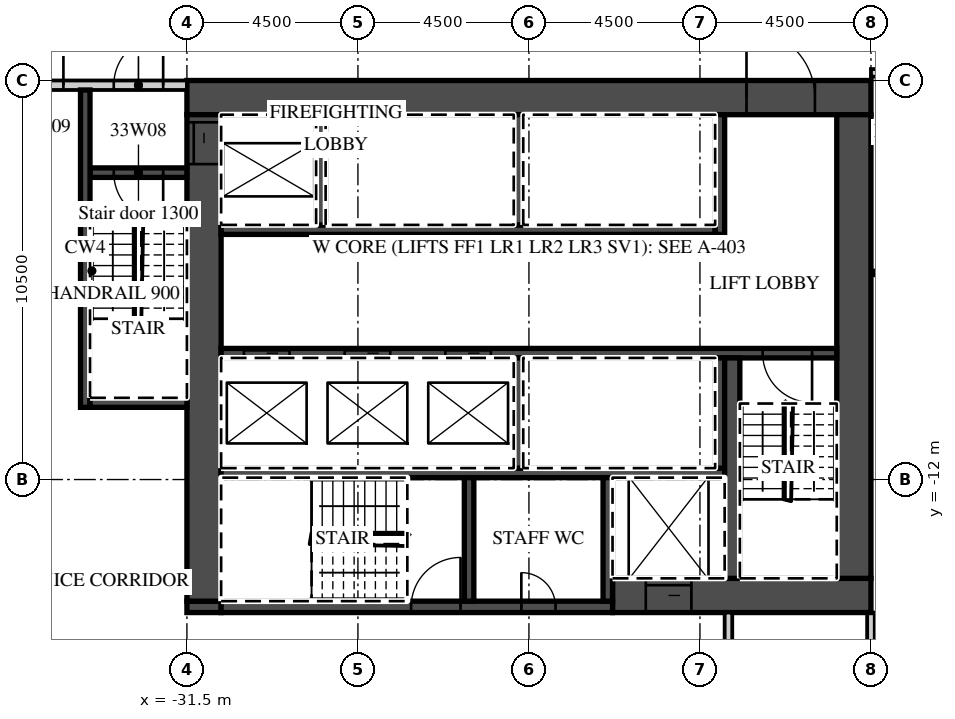
"""IFC4 building model, lengths in metres.
Left out: names, types, materials, properties, quantities, classifications, styles, units other than length and angle.
Written with IfcOpenShell. Run it as: python <this file> out.ifc"""

import sys

from ifc_helpers import new_model, si_unit, direction, frame, frame_2d, origin, place, context, subcontext, project, spatial, rectangle, extrude, element, fill, save


model = new_model("IFC4")
c1 = context("Model", 3, precision=1e-05, world=origin(), true_north=direction((0.0, 1.0)))
c2 = subcontext(c1, "Body", "Model", "MODEL_VIEW")
j1 = project(units=[si_unit("LENGTHUNIT", "METRE"), si_unit("PLANEANGLEUNIT", "RADIAN")], contexts=[c1])
p1 = place(None, origin())
s1 = spatial("IfcSite", under=j1, at=p1, CompositionType="ELEMENT")
p2 = place(p1, origin())
s2 = spatial("IfcBuilding", under=s1, at=p2, CompositionType="ELEMENT")
p3 = place(p2, frame((0.0, 0.0, 143.8)))
s3 = spatial("IfcBuildingStorey", under=s2, at=p3, CompositionType="ELEMENT", Elevation=143.8)
p4 = place(p3, frame((-13.5, -22.232, 0.0), z_axis=(0.0, 0.0, 1.0), x_axis=(0.0, 1.0, 0.0)))
e1 = element("IfcWall", 1, at=p4, inside=s3, PredefinedType="PARTITIONING", context=c2, shape_type="SweptSolid", body=[
    extrude(rectangle(XDim=6.732, YDim=0.2, at=frame_2d((3.366, 0.0))), origin(), (0.0, 0.0, 1.0), 3.02),
])
p5 = place(p3, frame((-13.5, -1.3, 0.0), z_axis=(0.0, 0.0, 1.0), x_axis=(1.0, 0.0, 0.0)))
e2 = element("IfcWall", 2, at=p5, inside=s3, PredefinedType="PARTITIONING", context=c2, shape_type="SweptSolid", body=[
    extrude(rectangle(XDim=60.932, YDim=0.2, at=frame_2d((30.466, 0.0))), origin(), (0.0, 0.0, 1.0), 3.02),
])
p6 = place(p5, frame((2.925, 0.0, 0.0)))
e3 = element("IfcOpeningElement", 3, at=p6, cuts=e2, PredefinedType="OPENING", context=c2, shape_type="SweptSolid", body=[
    extrude(rectangle(XDim=1.0, YDim=2.1, at=frame_2d((0.5, 1.05))), frame((0.0, 0.11, 0.0), z_axis=(0.0, -1.0, 0.0), x_axis=(1.0, 0.0, 0.0)), (0.0, 0.0, 1.0), 0.22),
])
p7 = place(p5, frame((6.938, 0.0, 0.0)))
e4 = element("IfcOpeningElement", 4, at=p7, cuts=e2, PredefinedType="OPENING", context=c2, shape_type="SweptSolid", body=[
    extrude(rectangle(XDim=1.2, YDim=2.1, at=frame_2d((0.6, 1.05))), frame((0.0, 0.11, 0.0), z_axis=(0.0, -1.0, 0.0), x_axis=(1.0, 0.0, 0.0)), (0.0, 0.0, 1.0), 0.22),
])
p8 = place(p5, frame((15.938, 0.0, 0.0)))
e5 = element("IfcOpeningElement", 5, at=p8, cuts=e2, PredefinedType="OPENING", context=c2, shape_type="SweptSolid", body=[
    extrude(rectangle(XDim=1.2, YDim=2.1, at=frame_2d((0.6, 1.05))), frame((0.0, 0.11, 0.0), z_axis=(0.0, -1.0, 0.0), x_axis=(1.0, 0.0, 0.0)), (0.0, 0.0, 1.0), 0.22),
])
p9 = place(p5, frame((24.938, 0.0, 0.0)))
e6 = element("IfcOpeningElement", 6, at=p9, cuts=e2, PredefinedType="OPENING", context=c2, shape_type="SweptSolid", body=[
    extrude(rectangle(XDim=1.2, YDim=2.1, at=frame_2d((0.6, 1.05))), frame((0.0, 0.11, 0.0), z_axis=(0.0, -1.0, 0.0), x_axis=(1.0, 0.0, 0.0)), (0.0, 0.0, 1.0), 0.22),
])
p10 = place(p5, frame((32.075, 0.0, 0.0)))
e7 = element("IfcOpeningElement", 7, at=p10, cuts=e2, PredefinedType="OPENING", context=c2, shape_type="SweptSolid", body=[
    extrude(rectangle(XDim=1.0, YDim=2.1, at=frame_2d((0.5, 1.05))), frame((0.0, 0.11, 0.0), z_axis=(0.0, -1.0, 0.0), x_axis=(1.0, 0.0, 0.0)), (0.0, 0.0, 1.0), 0.22),
])
p11 = place(p5, frame((36.55, 0.0, 0.0)))
e8 = element("IfcOpeningElement", 8, at=p11, cuts=e2, PredefinedType="OPENING", context=c2, shape_type="SweptSolid", body=[
    extrude(rectangle(XDim=1.0, YDim=2.1, at=frame_2d((0.5, 1.05))), frame((0.0, 0.11, 0.0), z_axis=(0.0, -1.0, 0.0), x_axis=(1.0, 0.0, 0.0)), (0.0, 0.0, 1.0), 0.22),
])
p12 = place(p5, frame((42.938, 0.0, 0.0)))
e9 = element("IfcOpeningElement", 9, at=p12, cuts=e2, PredefinedType="OPENING", context=c2, shape_type="SweptSolid", body=[
    extrude(rectangle(XDim=1.2, YDim=2.1, at=frame_2d((0.6, 1.05))), frame((0.0, 0.11, 0.0), z_axis=(0.0, -1.0, 0.0), x_axis=(1.0, 0.0, 0.0)), (0.0, 0.0, 1.0), 0.22),
])
p13 = place(p5, frame((52.425, 0.0, 0.0)))
e10 = element("IfcOpeningElement", 10, at=p13, cuts=e2, PredefinedType="OPENING", context=c2, shape_type="SweptSolid", body=[
    extrude(rectangle(XDim=1.0, YDim=2.1, at=frame_2d((0.5, 1.05))), frame((0.0, 0.11, 0.0), z_axis=(0.0, -1.0, 0.0), x_axis=(1.0, 0.0, 0.0)), (0.0, 0.0, 1.0), 0.22),
])
p14 = place(p5, frame((58.316, 0.0, 0.0)))
e11 = element("IfcOpeningElement", 11, at=p14, cuts=e2, PredefinedType="OPENING", context=c2, shape_type="SweptSolid", body=[
    extrude(rectangle(XDim=1.2, YDim=2.1, at=frame_2d((0.6, 1.05))), frame((0.0, 0.11, 0.0), z_axis=(0.0, -1.0, 0.0), x_axis=(1.0, 0.0, 0.0)), (0.0, 0.0, 1.0), 0.22),
])
p15 = place(p3, frame((-31.5, -1.95, 0.0), z_axis=(0.0, 0.0, 1.0), x_axis=(1.0, 0.0, 0.0)))
e12 = element("IfcWall", 12, at=p15, inside=s3, PredefinedType="SHEAR", context=c2, shape_type="SweptSolid", body=[
    extrude(rectangle(XDim=18.0, YDim=0.9, at=frame_2d((9.0, 0.0))), origin(), (0.0, 0.0, 1.0), 3.02),
])
p16 = place(p15, frame((14.725, 0.0, 0.0)))
e13 = element("IfcOpeningElement", 13, at=p16, cuts=e12, PredefinedType="OPENING", context=c2, shape_type="SweptSolid", body=[
    extrude(rectangle(XDim=1.8, YDim=2.1, at=frame_2d((0.9, 1.05))), frame((0.0, 0.46, 0.0), z_axis=(0.0, -1.0, 0.0), x_axis=(1.0, 0.0, 0.0)), (0.0, 0.0, 1.0), 0.92),
])
p17 = place(p3, frame((-20.3, -15.05, 0.0), z_axis=(0.0, 0.0, 1.0), x_axis=(1.0, 0.0, 0.0)))
e14 = element("IfcWall", 14, at=p17, inside=s3, PredefinedType="SHEAR", context=c2, shape_type="SweptSolid", body=[
    extrude(rectangle(XDim=6.8, YDim=0.9, at=frame_2d((3.4, 0.0))), origin(), (0.0, 0.0, 1.0), 3.02),
])
p18 = place(p17, frame((0.875, 0.0, 0.0)))
e15 = element("IfcOpeningElement", 15, at=p18, cuts=e14, PredefinedType="OPENING", context=c2, shape_type="SweptSolid", body=[
    extrude(rectangle(XDim=1.2, YDim=2.1, at=frame_2d((0.6, 1.05))), frame((0.0, 0.46, 0.0), z_axis=(0.0, -1.0, 0.0), x_axis=(1.0, 0.0, 0.0)), (0.0, 0.0, 1.0), 0.92),
])
p19 = place(p3, frame((-31.5, -15.35, 0.0), z_axis=(0.0, 0.0, 1.0), x_axis=(1.0, 0.0, 0.0)))
e16 = element("IfcWall", 16, at=p19, inside=s3, PredefinedType="SHEAR", context=c2, shape_type="SweptSolid", body=[
    extrude(rectangle(XDim=0.9, YDim=0.3, at=frame_2d((0.45, 0.0))), origin(), (0.0, 0.0, 1.0), 3.02),
])
p20 = place(p3, frame((-30.6, -15.35, 0.0), z_axis=(0.0, 0.0, 1.0), x_axis=(1.0, 0.0, 0.0)))
e17 = element("IfcWall", 17, at=p20, inside=s3, PredefinedType="SHEAR", context=c2, shape_type="SweptSolid", body=[
    extrude(rectangle(XDim=10.3, YDim=0.3, at=frame_2d((5.15, 0.0))), origin(), (0.0, 0.0, 1.0), 3.02),
])
p21 = place(p20, frame((5.0, 0.0, 0.0)))
e18 = element("IfcOpeningElement", 18, at=p21, cuts=e17, PredefinedType="OPENING", context=c2, shape_type="SweptSolid", body=[
    extrude(rectangle(XDim=1.3, YDim=2.1, at=frame_2d((0.65, 1.05))), frame((0.0, 0.16, 0.0), z_axis=(0.0, -1.0, 0.0), x_axis=(1.0, 0.0, 0.0)), (0.0, 0.0, 1.0), 0.32),
])
p22 = place(p20, frame((7.9, 0.0, 0.0)))
e19 = element("IfcOpeningElement", 19, at=p22, cuts=e17, PredefinedType="OPENING", context=c2, shape_type="SweptSolid", body=[
    extrude(rectangle(XDim=0.9, YDim=2.1, at=frame_2d((0.45, 1.05))), frame((0.0, 0.16, 0.0), z_axis=(0.0, -1.0, 0.0), x_axis=(1.0, 0.0, 0.0)), (0.0, 0.0, 1.0), 0.32),
])
p23 = place(p3, frame((-31.05, -15.2, 0.0), z_axis=(0.0, 0.0, 1.0), x_axis=(0.0, 1.0, 0.0)))
e20 = element("IfcWall", 20, at=p23, inside=s3, PredefinedType="SHEAR", context=c2, shape_type="SweptSolid", body=[
    extrude(rectangle(XDim=12.8, YDim=0.9, at=frame_2d((6.4, 0.0))), origin(), (0.0, 0.0, 1.0), 3.02),
])
p24 = place(p23, frame((11.5, 0.0, 0.0)))
e21 = element("IfcOpeningElement", 21, at=p24, cuts=e20, PredefinedType="OPENING", context=c2, shape_type="SweptSolid", body=[
    extrude(rectangle(XDim=1.1, YDim=2.1, at=frame_2d((0.55, 1.05))), frame((0.0, 0.46, 0.0), z_axis=(0.0, -1.0, 0.0), x_axis=(1.0, 0.0, 0.0)), (0.0, 0.0, 1.0), 0.92),
])
p25 = place(p3, frame((-13.95, -14.6, 0.0), z_axis=(0.0, 0.0, 1.0), x_axis=(0.0, 1.0, 0.0)))
e22 = element("IfcWall", 22, at=p25, inside=s3, PredefinedType="SHEAR", context=c2, shape_type="SweptSolid", body=[
    extrude(rectangle(XDim=12.2, YDim=0.9, at=frame_2d((6.1, 0.0))), origin(), (0.0, 0.0, 1.0), 3.02),
])
p26 = place(p3, frame((-30.6, -5.425, 0.0), z_axis=(0.0, 0.0, 1.0), x_axis=(1.0, 0.0, 0.0)))
e23 = element("IfcWall", 23, at=p26, inside=s3, PredefinedType="SHEAR", context=c2, shape_type="SweptSolid", body=[
    extrude(rectangle(XDim=13.0, YDim=0.25, at=frame_2d((6.5, 0.0))), origin(), (0.0, 0.0, 1.0), 3.02),
])
p27 = place(p3, frame((-17.475, -5.55, 0.0), z_axis=(0.0, 0.0, 1.0), x_axis=(0.0, 1.0, 0.0)))
e24 = element("IfcWall", 24, at=p27, inside=s3, PredefinedType="SHEAR", context=c2, shape_type="SweptSolid", body=[
    extrude(rectangle(XDim=3.15, YDim=0.25, at=frame_2d((1.575, 0.0))), origin(), (0.0, 0.0, 1.0), 3.02),
])
for number, where, z_axis, x_axis in (
    (25, (-27.975, -5.3, 0.0), (0.0, 0.0, 1.0), (0.0, 1.0, 0.0)),
    (26, (-22.775, -5.3, 0.0), (0.0, 0.0, 1.0), (0.0, 1.0, 0.0)),
):
    element("IfcWall", number, at=place(p3, frame(where, z_axis=z_axis, x_axis=x_axis)), inside=s3, PredefinedType="SHEAR", context=c2, shape_type="SweptSolid", body=[
        extrude(rectangle(XDim=2.9, YDim=0.25, at=frame_2d((1.45, 0.0))), origin(), (0.0, 0.0, 1.0), 3.02),
    ])
p28 = place(p3, frame((-30.6, -8.675, 0.0), z_axis=(0.0, 0.0, 1.0), x_axis=(1.0, 0.0, 0.0)))
e27 = element("IfcWall", 27, at=p28, inside=s3, PredefinedType="SHEAR", context=c2, shape_type="SweptSolid", body=[
    extrude(rectangle(XDim=16.2, YDim=0.25, at=frame_2d((8.1, 0.0))), origin(), (0.0, 0.0, 1.0), 3.02),
])
p29 = place(p28, frame((0.6, 0.0, 0.0)))
e28 = element("IfcOpeningElement", 28, at=p29, cuts=e27, PredefinedType="OPENING", context=c2, shape_type="SweptSolid", body=[
    extrude(rectangle(XDim=1.2, YDim=2.1, at=frame_2d((0.6, 1.05))), frame((0.0, 0.135, 0.0), z_axis=(0.0, -1.0, 0.0), x_axis=(1.0, 0.0, 0.0)), (0.0, 0.0, 1.0), 0.27),
])
p30 = place(p28, frame((3.25, 0.0, 0.0)))
e29 = element("IfcOpeningElement", 29, at=p30, cuts=e27, PredefinedType="OPENING", context=c2, shape_type="SweptSolid", body=[
    extrude(rectangle(XDim=1.2, YDim=2.1, at=frame_2d((0.6, 1.05))), frame((0.0, 0.135, 0.0), z_axis=(0.0, -1.0, 0.0), x_axis=(1.0, 0.0, 0.0)), (0.0, 0.0, 1.0), 0.27),
])
p31 = place(p28, frame((5.9, 0.0, 0.0)))
e30 = element("IfcOpeningElement", 30, at=p31, cuts=e27, PredefinedType="OPENING", context=c2, shape_type="SweptSolid", body=[
    extrude(rectangle(XDim=1.2, YDim=2.1, at=frame_2d((0.6, 1.05))), frame((0.0, 0.135, 0.0), z_axis=(0.0, -1.0, 0.0), x_axis=(1.0, 0.0, 0.0)), (0.0, 0.0, 1.0), 0.27),
])
p32 = place(p28, frame((14.25, 0.0, 0.0)))
e31 = element("IfcOpeningElement", 31, at=p32, cuts=e27, PredefinedType="OPENING", context=c2, shape_type="SweptSolid", body=[
    extrude(rectangle(XDim=1.3, YDim=2.1, at=frame_2d((0.65, 1.05))), frame((0.0, 0.135, 0.0), z_axis=(0.0, -1.0, 0.0), x_axis=(1.0, 0.0, 0.0)), (0.0, 0.0, 1.0), 0.27),
])
p33 = place(p3, frame((-30.6, -11.825, 0.0), z_axis=(0.0, 0.0, 1.0), x_axis=(1.0, 0.0, 0.0)))
e32 = element("IfcWall", 32, at=p33, inside=s3, PredefinedType="SHEAR", context=c2, shape_type="SweptSolid", body=[
    extrude(rectangle(XDim=13.25, YDim=0.25, at=frame_2d((6.625, 0.0))), origin(), (0.0, 0.0, 1.0), 3.02),
])
for number, where, z_axis, x_axis in (
    (33, (-17.475, -11.7, 0.0), (0.0, 0.0, 1.0), (0.0, 1.0, 0.0)),
    (34, (-22.775, -11.7, 0.0), (0.0, 0.0, 1.0), (0.0, 1.0, 0.0)),
):
    element("IfcWall", number, at=place(p3, frame(where, z_axis=z_axis, x_axis=x_axis)), inside=s3, PredefinedType="SHEAR", context=c2, shape_type="SweptSolid", body=[
        extrude(rectangle(XDim=2.9, YDim=0.25, at=frame_2d((1.45, 0.0))), origin(), (0.0, 0.0, 1.0), 3.02),
    ])
p34 = place(p3, frame((-17.15, -14.6, 0.0), z_axis=(0.0, 0.0, 1.0), x_axis=(0.0, 1.0, 0.0)))
e35 = element("IfcWall", 35, at=p34, inside=s3, PredefinedType="SHEAR", context=c2, shape_type="SweptSolid", body=[
    extrude(rectangle(XDim=5.8, YDim=0.4, at=frame_2d((2.9, 0.0))), origin(), (0.0, 0.0, 1.0), 3.02),
])
for number, where, z_axis, x_axis in (
    (36, (-20.425, -15.2, 0.0), (0.0, 0.0, 1.0), (0.0, 1.0, 0.0)),
    (37, (-24.075, -15.2, 0.0), (0.0, 0.0, 1.0), (0.0, 1.0, 0.0)),
):
    element("IfcWall", number, at=place(p3, frame(where, z_axis=z_axis, x_axis=x_axis)), inside=s3, PredefinedType="SHEAR", context=c2, shape_type="SweptSolid", body=[
        extrude(rectangle(XDim=3.25, YDim=0.25, at=frame_2d((1.625, 0.0))), origin(), (0.0, 0.0, 1.0), 3.02),
    ])
p35 = place(p3, frame((-39.035, -1.625, 0.0), z_axis=(0.0, 0.0, 1.0), x_axis=(1.0, 0.0, 0.0)))
e38 = element("IfcWall", 38, at=p35, inside=s3, PredefinedType="PARTITIONING", context=c2, shape_type="SweptSolid", body=[
    extrude(rectangle(XDim=7.535, YDim=0.25, at=frame_2d((3.768, 0.0))), origin(), (0.0, 0.0, 1.0), 3.02),
])
p36 = place(p35, frame((5.61, 0.0, 0.0)))
e39 = element("IfcOpeningElement", 39, at=p36, cuts=e38, PredefinedType="OPENING", context=c2, shape_type="SweptSolid", body=[
    extrude(rectangle(XDim=1.3, YDim=2.1, at=frame_2d((0.65, 1.05))), frame((0.0, 0.135, 0.0), z_axis=(0.0, -1.0, 0.0), x_axis=(1.0, 0.0, 0.0)), (0.0, 0.0, 1.0), 0.27),
])
p37 = place(p35, frame((3.185, 0.0, 0.0)))
e40 = element("IfcOpeningElement", 40, at=p37, cuts=e38, PredefinedType="OPENING", context=c2, shape_type="SweptSolid", body=[
    extrude(rectangle(XDim=1.1, YDim=2.1, at=frame_2d((0.55, 1.05))), frame((0.0, 0.135, 0.0), z_axis=(0.0, -1.0, 0.0), x_axis=(1.0, 0.0, 0.0)), (0.0, 0.0, 1.0), 0.27),
])
p38 = place(p3, frame((-34.05, -3.925, 0.0), z_axis=(0.0, 0.0, 1.0), x_axis=(1.0, 0.0, 0.0)))
e41 = element("IfcWall", 41, at=p38, inside=s3, PredefinedType="SHEAR", context=c2, shape_type="SweptSolid", body=[
    extrude(rectangle(XDim=2.55, YDim=0.25, at=frame_2d((1.275, 0.0))), origin(), (0.0, 0.0, 1.0), 3.02),
])
p39 = place(p38, frame((0.625, 0.0, 0.0)))
e42 = element("IfcOpeningElement", 42, at=p39, cuts=e41, PredefinedType="OPENING", context=c2, shape_type="SweptSolid", body=[
    extrude(rectangle(XDim=1.3, YDim=2.1, at=frame_2d((0.65, 1.05))), frame((0.0, 0.135, 0.0), z_axis=(0.0, -1.0, 0.0), x_axis=(1.0, 0.0, 0.0)), (0.0, 0.0, 1.0), 0.27),
])
p40 = place(p3, frame((-34.175, -10.1, 0.0), z_axis=(0.0, 0.0, 1.0), x_axis=(0.0, 1.0, 0.0)))
e43 = element("IfcWall", 43, at=p40, inside=s3, PredefinedType="SHEAR", context=c2, shape_type="SweptSolid", body=[
    extrude(rectangle(XDim=8.35, YDim=0.25, at=frame_2d((4.175, 0.0))), origin(), (0.0, 0.0, 1.0), 3.02),
])
p41 = place(p3, frame((-34.05, -9.975, 0.0), z_axis=(0.0, 0.0, 1.0), x_axis=(1.0, 0.0, 0.0)))
e44 = element("IfcWall", 44, at=p41, inside=s3, PredefinedType="SHEAR", context=c2, shape_type="SweptSolid", body=[
    extrude(rectangle(XDim=2.55, YDim=0.25, at=frame_2d((1.275, 0.0))), origin(), (0.0, 0.0, 1.0), 3.02),
])
p42 = place(p3, frame((-17.25, -17.7, 0.0), z_axis=(0.0, 0.0, 1.0), x_axis=(0.0, 1.0, 0.0)))
e45 = element("IfcWall", 45, at=p42, inside=s3, PredefinedType="PARTITIONING", context=c2, shape_type="SweptSolid", body=[
    extrude(rectangle(XDim=2.2, YDim=0.2, at=frame_2d((1.1, 0.0))), origin(), (0.0, 0.0, 1.0), 3.02),
])
p43 = place(p29, origin())
e46 = element("IfcDoor", 46, at=p43, inside=s3, OperationType="SLIDING_TO_LEFT", PredefinedType="DOOR", context=c2, shape_type="SweptSolid", body=[
    extrude(rectangle(XDim=1.2, YDim=2.1, at=frame_2d((0.6, 1.05))), frame((0.0, 0.025, 0.0), z_axis=(0.0, -1.0, 0.0), x_axis=(1.0, 0.0, 0.0)), (0.0, 0.0, 1.0), 0.05),
])
fill(e28, e46)
p44 = place(p30, origin())
e47 = element("IfcDoor", 47, at=p44, inside=s3, OperationType="SLIDING_TO_RIGHT", PredefinedType="DOOR", context=c2, shape_type="SweptSolid", body=[
    extrude(rectangle(XDim=1.2, YDim=2.1, at=frame_2d((0.6, 1.05))), frame((0.0, 0.025, 0.0), z_axis=(0.0, -1.0, 0.0), x_axis=(1.0, 0.0, 0.0)), (0.0, 0.0, 1.0), 0.05),
])
fill(e29, e47)
p45 = place(p31, origin())
e48 = element("IfcDoor", 48, at=p45, inside=s3, OperationType="SLIDING_TO_RIGHT", PredefinedType="DOOR", context=c2, shape_type="SweptSolid", body=[
    extrude(rectangle(XDim=1.2, YDim=2.1, at=frame_2d((0.6, 1.05))), frame((0.0, 0.025, 0.0), z_axis=(0.0, -1.0, 0.0), x_axis=(1.0, 0.0, 0.0)), (0.0, 0.0, 1.0), 0.05),
])
fill(e30, e48)
p46 = place(p18, origin())
e49 = element("IfcDoor", 49, at=p46, inside=s3, OperationType="SLIDING_TO_LEFT", PredefinedType="DOOR", context=c2, shape_type="SweptSolid", body=[
    extrude(rectangle(XDim=1.2, YDim=2.1, at=frame_2d((0.6, 1.05))), frame((0.0, 0.025, 0.0), z_axis=(0.0, -1.0, 0.0), x_axis=(1.0, 0.0, 0.0)), (0.0, 0.0, 1.0), 0.05),
])
fill(e15, e49)
p47 = place(p24, origin())
e50 = element("IfcDoor", 50, at=p47, inside=s3, OperationType="SLIDING_TO_RIGHT", PredefinedType="DOOR", context=c2, shape_type="SweptSolid", body=[
    extrude(rectangle(XDim=1.1, YDim=2.1, at=frame_2d((0.55, 1.05))), frame((0.0, 0.025, 0.0), z_axis=(0.0, -1.0, 0.0), x_axis=(1.0, 0.0, 0.0)), (0.0, 0.0, 1.0), 0.05),
])
fill(e21, e50)
p48 = place(p16, origin())
e51 = element("IfcDoor", 51, at=p48, inside=s3, OperationType="DOUBLE_DOOR_DOUBLE_SWING", PredefinedType="DOOR", context=c2, shape_type="SweptSolid", body=[
    extrude(rectangle(XDim=1.8, YDim=2.1, at=frame_2d((0.9, 1.05))), frame((0.0, 0.025, 0.0), z_axis=(0.0, -1.0, 0.0), x_axis=(1.0, 0.0, 0.0)), (0.0, 0.0, 1.0), 0.05),
])
fill(e13, e51)
p49 = place(p36, origin())
e52 = element("IfcDoor", 52, at=p49, inside=s3, OperationType="SINGLE_SWING_RIGHT", PredefinedType="DOOR", context=c2, shape_type="SweptSolid", body=[
    extrude(rectangle(XDim=1.3, YDim=2.1, at=frame_2d((0.65, 1.05))), frame((0.0, 0.025, 0.0), z_axis=(0.0, -1.0, 0.0), x_axis=(1.0, 0.0, 0.0)), (0.0, 0.0, 1.0), 0.05),
])
fill(e39, e52)
p50 = place(p39, origin())
e53 = element("IfcDoor", 53, at=p50, inside=s3, OperationType="SINGLE_SWING_RIGHT", PredefinedType="DOOR", context=c2, shape_type="SweptSolid", body=[
    extrude(rectangle(XDim=1.3, YDim=2.1, at=frame_2d((0.65, 1.05))), frame((0.0, 0.025, 0.0), z_axis=(0.0, -1.0, 0.0), x_axis=(1.0, 0.0, 0.0)), (0.0, 0.0, 1.0), 0.05),
])
fill(e42, e53)
p51 = place(p37, origin())
e54 = element("IfcDoor", 54, at=p51, inside=s3, OperationType="SINGLE_SWING_RIGHT", PredefinedType="DOOR", context=c2, shape_type="SweptSolid", body=[
    extrude(rectangle(XDim=1.1, YDim=2.1, at=frame_2d((0.55, 1.05))), frame((0.0, 0.025, 0.0), z_axis=(0.0, -1.0, 0.0), x_axis=(1.0, 0.0, 0.0)), (0.0, 0.0, 1.0), 0.05),
])
fill(e40, e54)
p52 = place(p32, origin())
e55 = element("IfcDoor", 55, at=p52, inside=s3, OperationType="SINGLE_SWING_RIGHT", PredefinedType="DOOR", context=c2, shape_type="SweptSolid", body=[
    extrude(rectangle(XDim=1.3, YDim=2.1, at=frame_2d((0.65, 1.05))), frame((0.0, 0.025, 0.0), z_axis=(0.0, -1.0, 0.0), x_axis=(1.0, 0.0, 0.0)), (0.0, 0.0, 1.0), 0.05),
])
fill(e31, e55)
p53 = place(p21, origin())
e56 = element("IfcDoor", 56, at=p53, inside=s3, OperationType="SINGLE_SWING_RIGHT", PredefinedType="DOOR", context=c2, shape_type="SweptSolid", body=[
    extrude(rectangle(XDim=1.3, YDim=2.1, at=frame_2d((0.65, 1.05))), frame((0.0, 0.025, 0.0), z_axis=(0.0, -1.0, 0.0), x_axis=(1.0, 0.0, 0.0)), (0.0, 0.0, 1.0), 0.05),
])
fill(e18, e56)
p54 = place(p22, origin())
e57 = element("IfcDoor", 57, at=p54, inside=s3, OperationType="SINGLE_SWING_LEFT", PredefinedType="DOOR", context=c2, shape_type="SweptSolid", body=[
    extrude(rectangle(XDim=0.9, YDim=2.1, at=frame_2d((0.45, 1.05))), frame((0.0, 0.025, 0.0), z_axis=(0.0, -1.0, 0.0), x_axis=(1.0, 0.0, 0.0)), (0.0, 0.0, 1.0), 0.05),
])
fill(e19, e57)
save(model, sys.argv[1])
